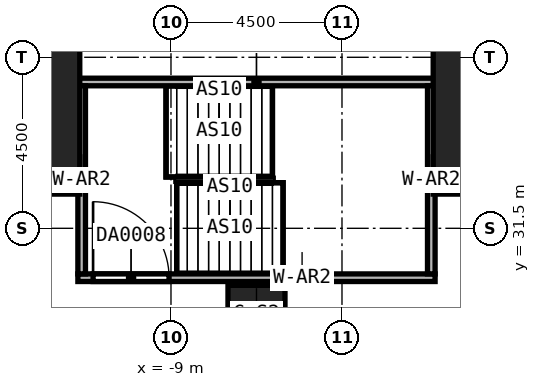
"""IFC4 building model, lengths in metres.
Left out: names, types, materials, properties, quantities, classifications, styles, units other than length and angle.
Written with IfcOpenShell. Run it as: python <this file> out.ifc"""

import sys

from ifc_helpers import new_model, si_unit, direction, frame, frame_2d, origin, origin_2d, place, context, subcontext, project, spatial, rectangle, extrude, element, fill, save


model = new_model("IFC4")
c1 = context("Model", 3, precision=1e-05, world=origin(), true_north=direction((0.0, 1.0)))
c2 = subcontext(c1, "Body", "Model", "MODEL_VIEW")
j1 = project(units=[si_unit("LENGTHUNIT", "METRE"), si_unit("PLANEANGLEUNIT", "RADIAN")], contexts=[c1])
p1 = place(None, origin())
s1 = spatial("IfcSite", under=j1, at=p1, CompositionType="ELEMENT")
p2 = place(p1, origin())
s2 = spatial("IfcBuilding", under=s1, at=p2, CompositionType="ELEMENT")
p3 = place(p2, frame((0.0, 0.0, 12.0)))
s3 = spatial("IfcBuildingStorey", under=s2, at=p3, CompositionType="ELEMENT", Elevation=12.0)
for number, where, z_axis, x_axis in (
    (1, (-13.5, 35.7, 0.0), (0.0, 0.0, 1.0), (1.0, 0.0, 0.0)),
    (2, (0.0, 35.7, 0.0), (0.0, 0.0, 1.0), (1.0, 0.0, 0.0)),
):
    element("IfcColumn", number, at=place(p3, frame(where, z_axis=z_axis, x_axis=x_axis)), inside=s3, PredefinedType="COLUMN", context=c2, shape_type="SweptSolid", body=[
        extrude(rectangle(XDim=4.2, YDim=6.6, at=origin_2d()), origin(), (0.0, 0.0, 1.0), 7.0),
    ])
p4 = place(p3, frame((-6.75, 29.25, 0.0), z_axis=(0.0, 0.0, 1.0), x_axis=(1.0, 0.0, 0.0)))
e3 = element("IfcColumn", 3, at=p4, inside=s3, PredefinedType="COLUMN", context=c2, shape_type="SweptSolid", body=[
    extrude(rectangle(XDim=1.5, YDim=1.5, at=origin_2d()), origin(), (0.0, 0.0, 1.0), 7.0),
])
p5 = place(p3, frame((-11.45, 30.2, 0.0), z_axis=(0.0, 0.0, 1.0), x_axis=(1.0, 0.0, 0.0)))
e4 = element("IfcWall", 4, at=p5, inside=s3, PredefinedType="SOLIDWALL", context=c2, shape_type="SweptSolid", body=[
    extrude(rectangle(XDim=9.4, YDim=0.2, at=frame_2d((4.7, 0.0))), origin(), (0.0, 0.0, 1.0), 7.0),
])
p6 = place(p5, frame((0.4, 0.0, 0.0)))
e5 = element("IfcOpeningElement", 5, at=p6, cuts=e4, PredefinedType="OPENING", context=c2, shape_type="SweptSolid", body=[
    extrude(rectangle(XDim=2.0, YDim=2.4, at=frame_2d((1.0, 1.2))), frame((0.0, 0.1, 0.0), z_axis=(0.0, -1.0, 0.0), x_axis=(1.0, 0.0, 0.0)), (0.0, 0.0, 1.0), 0.2),
])
p7 = place(p3, frame((-11.45, 35.35, 0.0), z_axis=(0.0, 0.0, 1.0), x_axis=(1.0, 0.0, 0.0)))
e6 = element("IfcWall", 6, at=p7, inside=s3, PredefinedType="SOLIDWALL", context=c2, shape_type="SweptSolid", body=[
    extrude(rectangle(XDim=9.4, YDim=0.2, at=frame_2d((4.7, 0.0))), origin(), (0.0, 0.0, 1.0), 7.0),
])
for number, where, z_axis, x_axis in (
    (7, (-11.35, 30.3, 0.0), (0.0, 0.0, 1.0), (0.0, 1.0, 0.0)),
    (8, (-2.15, 30.3, 0.0), (0.0, 0.0, 1.0), (0.0, 1.0, 0.0)),
):
    element("IfcWall", number, at=place(p3, frame(where, z_axis=z_axis, x_axis=x_axis)), inside=s3, PredefinedType="SOLIDWALL", context=c2, shape_type="SweptSolid", body=[
        extrude(rectangle(XDim=4.95, YDim=0.2, at=frame_2d((2.475, 0.0))), origin(), (0.0, 0.0, 1.0), 7.0),
    ])
p8 = place(p6, origin())
e9 = element("IfcDoor", 9, at=p8, inside=s3, OperationType="DOUBLE_DOOR_SINGLE_SWING", PredefinedType="DOOR", context=c2, shape_type="SweptSolid", body=[
    extrude(rectangle(XDim=2.0, YDim=2.4, at=frame_2d((1.0, 1.2))), frame((0.0, 0.025, 0.0), z_axis=(0.0, -1.0, 0.0), x_axis=(1.0, 0.0, 0.0)), (0.0, 0.0, 1.0), 0.05),
])
fill(e5, e9)
save(model, sys.argv[1])
